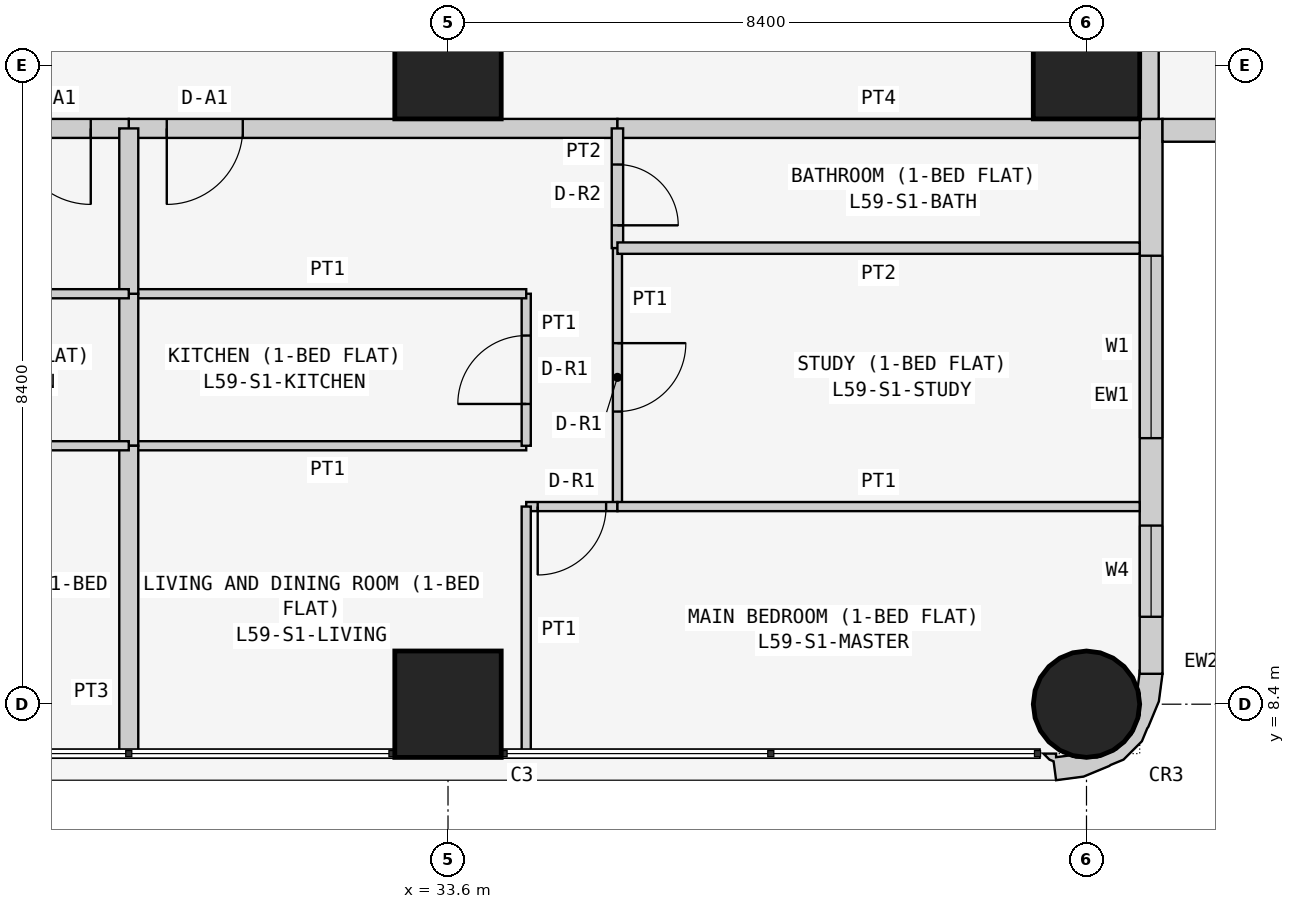
"""IFC4 building model, lengths in metres.
Left out: names, types, materials, properties, quantities, classifications, styles, units other than length and angle.
Written with IfcOpenShell. Run it as: python <this file> out.ifc"""

import sys

from ifc_helpers import new_model, si_unit, direction, frame, frame_2d, origin, origin_2d, place, context, subcontext, project, spatial, polyline, rectangle, circle, outline, extrude, element, fill, save


model = new_model("IFC4")
c1 = context("Model", 3, precision=1e-05, world=origin(), true_north=direction((0.0, 1.0)))
c2 = subcontext(c1, "Body", "Model", "MODEL_VIEW")
j1 = project(units=[si_unit("LENGTHUNIT", "METRE"), si_unit("PLANEANGLEUNIT", "RADIAN")], contexts=[c1])
p1 = place(None, origin())
s1 = spatial("IfcSite", under=j1, at=p1, CompositionType="ELEMENT")
p2 = place(p1, origin())
s2 = spatial("IfcBuilding", under=s1, at=p2, CompositionType="ELEMENT")
p3 = place(p2, frame((0.0, 0.0, 226.5)))
s3 = spatial("IfcBuildingStorey", under=s2, at=p3, CompositionType="ELEMENT", Elevation=226.5)
for number, where, z_axis, x_axis in (
    (1, (33.6, 8.4, 0.0), (0.0, 0.0, 1.0), (1.0, 0.0, 0.0)),
    (2, (33.6, 16.8, 0.0), (0.0, 0.0, 1.0), (1.0, 0.0, 0.0)),
):
    element("IfcColumn", number, at=place(p3, frame(where, z_axis=z_axis, x_axis=x_axis)), inside=s3, PredefinedType="COLUMN", context=c2, shape_type="SweptSolid", body=[
        extrude(rectangle(XDim=1.4, YDim=1.4, at=origin_2d()), origin(), (0.0, 0.0, 1.0), 3.6),
    ])
p4 = place(p3, frame((42.0, 8.4, 0.0), z_axis=(0.0, 0.0, 1.0), x_axis=(1.0, 0.0, 0.0)))
e3 = element("IfcColumn", 3, at=p4, inside=s3, PredefinedType="COLUMN", context=c2, shape_type="SweptSolid", body=[
    extrude(circle(Radius=0.7, at=origin_2d()), origin(), (0.0, 0.0, 1.0), 3.6),
])
p5 = place(p3, frame((42.0, 16.8, 0.0), z_axis=(0.0, 0.0, 1.0), x_axis=(1.0, 0.0, 0.0)))
e4 = element("IfcColumn", 4, at=p5, inside=s3, PredefinedType="COLUMN", context=c2, shape_type="SweptSolid", body=[
    extrude(rectangle(XDim=1.4, YDim=1.4, at=origin_2d()), origin(), (0.0, 0.0, 1.0), 3.6),
])
p6 = place(p3, frame((42.85, 8.8, 0.0), z_axis=(0.0, 0.0, 1.0), x_axis=(0.0, 1.0, 0.0)))
e5 = element("IfcWall", 5, at=p6, inside=s3, PredefinedType="SOLIDWALL", context=c2, shape_type="SweptSolid", body=[
    extrude(rectangle(XDim=7.3, YDim=0.3, at=frame_2d((3.65, 0.0))), origin(), (0.0, 0.0, 1.0), 3.45),
])
p7 = place(p6, frame((3.1, 0.0, 0.9)))
e6 = element("IfcOpeningElement", 6, at=p7, cuts=e5, PredefinedType="OPENING", context=c2, shape_type="SweptSolid", body=[
    extrude(rectangle(XDim=2.4, YDim=1.5, at=frame_2d((1.2, 0.75))), frame((0.0, 0.16, 0.0), z_axis=(0.0, -1.0, 0.0), x_axis=(1.0, 0.0, 0.0)), (0.0, 0.0, 1.0), 0.32),
])
p8 = place(p6, frame((0.75, 0.0, 0.9)))
e7 = element("IfcOpeningElement", 7, at=p8, cuts=e5, PredefinedType="OPENING", context=c2, shape_type="SweptSolid", body=[
    extrude(rectangle(XDim=1.2, YDim=1.5, at=frame_2d((0.6, 0.75))), frame((0.0, 0.16, 0.0), z_axis=(0.0, -1.0, 0.0), x_axis=(1.0, 0.0, 0.0)), (0.0, 0.0, 1.0), 0.32),
])
p9 = place(p3, frame((43.0, 15.95, 0.0), z_axis=(0.0, 0.0, 1.0), x_axis=(1.0, 0.0, 0.0)))
e8 = element("IfcWall", 8, at=p9, inside=s3, PredefinedType="SOLIDWALL", context=c2, shape_type="SweptSolid", body=[
    extrude(rectangle(XDim=7.0, YDim=0.3, at=frame_2d((3.5, 0.0))), origin(), (0.0, 0.0, 1.0), 3.45),
])
p10 = place(p9, frame((1.5, 0.0, 0.9)))
e9 = element("IfcOpeningElement", 9, at=p10, cuts=e8, PredefinedType="OPENING", context=c2, shape_type="SweptSolid", body=[
    extrude(rectangle(XDim=2.4, YDim=1.5, at=frame_2d((1.2, 0.75))), frame((0.0, 0.16, 0.0), z_axis=(0.0, -1.0, 0.0), x_axis=(1.0, 0.0, 0.0)), (0.0, 0.0, 1.0), 0.32),
])
p11 = place(p9, frame((5.05, 0.0, 0.9)))
e10 = element("IfcOpeningElement", 10, at=p11, cuts=e8, PredefinedType="OPENING", context=c2, shape_type="SweptSolid", body=[
    extrude(rectangle(XDim=1.2, YDim=1.5, at=frame_2d((0.6, 0.75))), frame((0.0, 0.16, 0.0), z_axis=(0.0, -1.0, 0.0), x_axis=(1.0, 0.0, 0.0)), (0.0, 0.0, 1.0), 0.32),
])
p12 = place(p3, frame((41.488, 7.812, 0.0), z_axis=(0.0, 0.0, 1.0), x_axis=(0.439933741929, -0.898030234854, 0.0)))
e11 = element("IfcWall", 11, at=p12, inside=s3, PredefinedType="SOLIDWALL", context=c2, shape_type="SweptSolid", body=[
    extrude(outline(polyline([(-0.222, 1.793), (-0.39, 1.541), (-0.372, 1.532), (-0.195, 1.414), (-0.12, 1.41), (0.131, 1.287), (0.315, 1.078), (0.406, 0.814), (0.388, 0.536), (0.265, 0.285), (0.209, 0.235), (0.148, 0.053), (0.105, 0.074), (0.032, -0.076), (0.138, -0.04), (0.182, -0.0), (0.419, -0.08), (0.536, 0.266), (0.559, 0.631), (0.555, 0.651), (0.566, 0.836), (0.455, 1.159), (0.333, 1.298), (0.324, 1.317), (0.082, 1.591), (-0.222, 1.793)])), origin(), (0.0, 0.0, 1.0), 3.45),
])
p13 = place(p3, frame((42.825, 22.571, 0.0), z_axis=(0.0, 0.0, 1.0), x_axis=(0.0, -1.0, 0.0)))
e12 = element("IfcWall", 12, at=p13, inside=s3, PredefinedType="PARTITIONING", context=c2, shape_type="SweptSolid", body=[
    extrude(rectangle(XDim=6.471, YDim=0.25, at=frame_2d((3.235, 0.0))), origin(), (0.0, 0.0, 1.0), 3.45),
])
p14 = place(p3, frame((35.829, 15.975, 0.0), z_axis=(0.0, 0.0, 1.0), x_axis=(-1.0, 0.0, 0.0)))
e13 = element("IfcWall", 13, at=p14, inside=s3, PredefinedType="PARTITIONING", context=c2, shape_type="SweptSolid", body=[
    extrude(rectangle(XDim=6.429, YDim=0.25, at=frame_2d((3.215, 0.0))), origin(), (0.0, 0.0, 1.0), 3.45),
])
p15 = place(p14, frame((4.929, 0.0, 0.0)))
e14 = element("IfcOpeningElement", 14, at=p15, cuts=e13, PredefinedType="OPENING", context=c2, shape_type="SweptSolid", body=[
    extrude(rectangle(XDim=1.0, YDim=2.1, at=frame_2d((0.5, 1.05))), frame((0.0, 0.135, 0.0), z_axis=(0.0, -1.0, 0.0), x_axis=(1.0, 0.0, 0.0)), (0.0, 0.0, 1.0), 0.27),
])
p16 = place(p3, frame((42.7, 15.975, 0.0), z_axis=(0.0, 0.0, 1.0), x_axis=(-1.0, 0.0, 0.0)))
e15 = element("IfcWall", 15, at=p16, inside=s3, PredefinedType="PARTITIONING", context=c2, shape_type="SweptSolid", body=[
    extrude(rectangle(XDim=6.871, YDim=0.25, at=frame_2d((3.436, 0.0))), origin(), (0.0, 0.0, 1.0), 3.45),
])
p17 = place(p3, frame((29.4, 15.975, 0.0), z_axis=(0.0, 0.0, 1.0), x_axis=(-1.0, 0.0, 0.0)))
e16 = element("IfcWall", 16, at=p17, inside=s3, PredefinedType="PARTITIONING", context=c2, shape_type="SweptSolid", body=[
    extrude(rectangle(XDim=6.429, YDim=0.25, at=frame_2d((3.214, 0.0))), origin(), (0.0, 0.0, 1.0), 3.45),
])
p18 = place(p17, frame((0.5, 0.0, 0.0)))
e17 = element("IfcOpeningElement", 17, at=p18, cuts=e16, PredefinedType="OPENING", context=c2, shape_type="SweptSolid", body=[
    extrude(rectangle(XDim=1.0, YDim=2.1, at=frame_2d((0.5, 1.05))), frame((0.0, 0.135, 0.0), z_axis=(0.0, -1.0, 0.0), x_axis=(1.0, 0.0, 0.0)), (0.0, 0.0, 1.0), 0.27),
])
p19 = place(p3, frame((29.4, 11.8, 0.0), z_axis=(0.0, 0.0, 1.0), x_axis=(1.0, 0.0, 0.0)))
e18 = element("IfcWall", 18, at=p19, inside=s3, PredefinedType="PARTITIONING", context=c2, shape_type="SweptSolid", body=[
    extrude(rectangle(XDim=5.229, YDim=0.12, at=frame_2d((2.615, 0.0))), origin(), (0.0, 0.0, 1.0), 3.45),
])
p20 = place(p3, frame((34.629, 11.8, 0.0), z_axis=(0.0, 0.0, 1.0), x_axis=(0.0, 1.0, 0.0)))
e19 = element("IfcWall", 19, at=p20, inside=s3, PredefinedType="PARTITIONING", context=c2, shape_type="SweptSolid", body=[
    extrude(rectangle(XDim=2.0, YDim=0.12, at=frame_2d((1.0, 0.0))), origin(), (0.0, 0.0, 1.0), 3.45),
])
p21 = place(p20, frame((0.55, 0.0, 0.0)))
e20 = element("IfcOpeningElement", 20, at=p21, cuts=e19, PredefinedType="OPENING", context=c2, shape_type="SweptSolid", body=[
    extrude(rectangle(XDim=0.9, YDim=2.1, at=frame_2d((0.45, 1.05))), frame((0.0, 0.07, 0.0), z_axis=(0.0, -1.0, 0.0), x_axis=(1.0, 0.0, 0.0)), (0.0, 0.0, 1.0), 0.14),
])
p22 = place(p3, frame((34.629, 13.8, 0.0), z_axis=(0.0, 0.0, 1.0), x_axis=(-1.0, 0.0, 0.0)))
e21 = element("IfcWall", 21, at=p22, inside=s3, PredefinedType="PARTITIONING", context=c2, shape_type="SweptSolid", body=[
    extrude(rectangle(XDim=5.229, YDim=0.12, at=frame_2d((2.615, 0.0))), origin(), (0.0, 0.0, 1.0), 3.45),
])
p23 = place(p3, frame((29.4, 13.8, 0.0), z_axis=(0.0, 0.0, 1.0), x_axis=(0.0, -1.0, 0.0)))
e22 = element("IfcWall", 22, at=p23, inside=s3, PredefinedType="PARTITIONING", context=c2, shape_type="SweptSolid", body=[
    extrude(rectangle(XDim=2.0, YDim=0.25, at=frame_2d((1.0, 0.0))), origin(), (0.0, 0.0, 1.0), 2.848),
])
p24 = place(p3, frame((35.829, 15.975, 0.0), z_axis=(0.0, 0.0, 1.0), x_axis=(0.0, -1.0, 0.0)))
e23 = element("IfcWall", 23, at=p24, inside=s3, PredefinedType="PARTITIONING", context=c2, shape_type="SweptSolid", body=[
    extrude(rectangle(XDim=1.575, YDim=0.15, at=frame_2d((0.788, 0.0))), origin(), (0.0, 0.0, 1.0), 3.45),
])
p25 = place(p24, frame((0.475, 0.0, 0.0)))
e24 = element("IfcOpeningElement", 24, at=p25, cuts=e23, PredefinedType="OPENING", context=c2, shape_type="SweptSolid", body=[
    extrude(rectangle(XDim=0.8, YDim=2.1, at=frame_2d((0.4, 1.05))), frame((0.0, 0.085, 0.0), z_axis=(0.0, -1.0, 0.0), x_axis=(1.0, 0.0, 0.0)), (0.0, 0.0, 1.0), 0.17),
])
p26 = place(p3, frame((35.829, 14.4, 0.0), z_axis=(0.0, 0.0, 1.0), x_axis=(0.0, -1.0, 0.0)))
e25 = element("IfcWall", 25, at=p26, inside=s3, PredefinedType="PARTITIONING", context=c2, shape_type="SweptSolid", body=[
    extrude(rectangle(XDim=3.4, YDim=0.12, at=frame_2d((1.7, 0.0))), origin(), (0.0, 0.0, 1.0), 3.45),
])
p27 = place(p26, frame((1.25, 0.0, 0.0)))
e26 = element("IfcOpeningElement", 26, at=p27, cuts=e25, PredefinedType="OPENING", context=c2, shape_type="SweptSolid", body=[
    extrude(rectangle(XDim=0.9, YDim=2.1, at=frame_2d((0.45, 1.05))), frame((0.0, 0.07, 0.0), z_axis=(0.0, -1.0, 0.0), x_axis=(1.0, 0.0, 0.0)), (0.0, 0.0, 1.0), 0.14),
])
p28 = place(p3, frame((35.829, 11.0, 0.0), z_axis=(0.0, 0.0, 1.0), x_axis=(-1.0, 0.0, 0.0)))
e27 = element("IfcWall", 27, at=p28, inside=s3, PredefinedType="PARTITIONING", context=c2, shape_type="SweptSolid", body=[
    extrude(rectangle(XDim=1.2, YDim=0.12, at=frame_2d((0.6, 0.0))), origin(), (0.0, 0.0, 1.0), 3.45),
])
p29 = place(p28, frame((0.149, 0.0, 0.0)))
e28 = element("IfcOpeningElement", 28, at=p29, cuts=e27, PredefinedType="OPENING", context=c2, shape_type="SweptSolid", body=[
    extrude(rectangle(XDim=0.9, YDim=2.1, at=frame_2d((0.45, 1.05))), frame((0.0, 0.07, 0.0), z_axis=(0.0, -1.0, 0.0), x_axis=(1.0, 0.0, 0.0)), (0.0, 0.0, 1.0), 0.14),
])
p30 = place(p3, frame((34.629, 11.0, 0.0), z_axis=(0.0, 0.0, 1.0), x_axis=(0.0, -1.0, 0.0)))
e29 = element("IfcWall", 29, at=p30, inside=s3, PredefinedType="PARTITIONING", context=c2, shape_type="SweptSolid", body=[
    extrude(rectangle(XDim=3.25, YDim=0.12, at=frame_2d((1.625, 0.0))), origin(), (0.0, 0.0, 1.0), 3.45),
])
p31 = place(p3, frame((29.4, 7.75, 0.0), z_axis=(0.0, 0.0, 1.0), x_axis=(0.0, 1.0, 0.0)))
e30 = element("IfcWall", 30, at=p31, inside=s3, PredefinedType="PARTITIONING", context=c2, shape_type="SweptSolid", body=[
    extrude(rectangle(XDim=4.05, YDim=0.25, at=frame_2d((2.025, 0.0))), origin(), (0.0, 0.0, 1.0), 2.848),
])
p32 = place(p3, frame((29.4, 13.8, 0.0), z_axis=(0.0, 0.0, 1.0), x_axis=(0.0, 1.0, 0.0)))
e31 = element("IfcWall", 31, at=p32, inside=s3, PredefinedType="PARTITIONING", context=c2, shape_type="SweptSolid", body=[
    extrude(rectangle(XDim=2.175, YDim=0.25, at=frame_2d((1.087, 0.0))), origin(), (0.0, 0.0, 1.0), 2.848),
])
p33 = place(p3, frame((35.829, 14.4, 0.0), z_axis=(0.0, 0.0, 1.0), x_axis=(1.0, 0.0, 0.0)))
e32 = element("IfcWall", 32, at=p33, inside=s3, PredefinedType="PARTITIONING", context=c2, shape_type="SweptSolid", body=[
    extrude(rectangle(XDim=6.871, YDim=0.15, at=frame_2d((3.436, 0.0))), origin(), (0.0, 0.0, 1.0), 3.45),
])
p34 = place(p3, frame((35.829, 11.0, 0.0), z_axis=(0.0, 0.0, 1.0), x_axis=(1.0, 0.0, 0.0)))
e33 = element("IfcWall", 33, at=p34, inside=s3, PredefinedType="PARTITIONING", context=c2, shape_type="SweptSolid", body=[
    extrude(rectangle(XDim=6.871, YDim=0.12, at=frame_2d((3.436, 0.0))), origin(), (0.0, 0.0, 1.0), 3.45),
])
for number, where, z_axis, x_axis in (
    (34, (29.4, 11.8, 0.0), (0.0, 0.0, 1.0), (-1.0, 0.0, 0.0)),
    (35, (24.171, 13.8, 0.0), (0.0, 0.0, 1.0), (1.0, 0.0, 0.0)),
):
    element("IfcWall", number, at=place(p3, frame(where, z_axis=z_axis, x_axis=x_axis)), inside=s3, PredefinedType="PARTITIONING", context=c2, shape_type="SweptSolid", body=[
        extrude(rectangle(XDim=5.229, YDim=0.12, at=frame_2d((2.615, 0.0))), origin(), (0.0, 0.0, 1.0), 3.45),
    ])
p35 = place(p7, origin())
e36 = element("IfcWindow", 36, at=p35, inside=s3, PartitioningType="SINGLE_PANEL", PredefinedType="WINDOW", context=c2, shape_type="SweptSolid", body=[
    extrude(rectangle(XDim=2.4, YDim=1.5, at=frame_2d((1.2, 0.75))), frame((0.0, 0.03, 0.0), z_axis=(0.0, -1.0, 0.0), x_axis=(1.0, 0.0, 0.0)), (0.0, 0.0, 1.0), 0.06),
])
fill(e6, e36)
p36 = place(p8, origin())
e37 = element("IfcWindow", 37, at=p36, inside=s3, PartitioningType="SINGLE_PANEL", PredefinedType="WINDOW", context=c2, shape_type="SweptSolid", body=[
    extrude(rectangle(XDim=1.2, YDim=1.5, at=frame_2d((0.6, 0.75))), frame((0.0, 0.03, 0.0), z_axis=(0.0, -1.0, 0.0), x_axis=(1.0, 0.0, 0.0)), (0.0, 0.0, 1.0), 0.06),
])
fill(e7, e37)
p37 = place(p15, origin())
e38 = element("IfcDoor", 38, at=p37, inside=s3, OperationType="SINGLE_SWING_RIGHT", PredefinedType="DOOR", context=c2, shape_type="SweptSolid", body=[
    extrude(rectangle(XDim=1.0, YDim=2.1, at=frame_2d((0.5, 1.05))), frame((0.0, 0.025, 0.0), z_axis=(0.0, -1.0, 0.0), x_axis=(1.0, 0.0, 0.0)), (0.0, 0.0, 1.0), 0.05),
])
fill(e14, e38)
p38 = place(p21, origin())
e39 = element("IfcDoor", 39, at=p38, inside=s3, OperationType="SINGLE_SWING_LEFT", PredefinedType="DOOR", context=c2, shape_type="SweptSolid", body=[
    extrude(rectangle(XDim=0.9, YDim=2.1, at=frame_2d((0.45, 1.05))), frame((0.0, 0.025, 0.0), z_axis=(0.0, -1.0, 0.0), x_axis=(1.0, 0.0, 0.0)), (0.0, 0.0, 1.0), 0.05),
])
fill(e20, e39)
p39 = place(p25, origin())
e40 = element("IfcDoor", 40, at=p39, inside=s3, OperationType="SINGLE_SWING_RIGHT", PredefinedType="DOOR", context=c2, shape_type="SweptSolid", body=[
    extrude(rectangle(XDim=0.8, YDim=2.1, at=frame_2d((0.4, 1.05))), frame((0.0, 0.025, 0.0), z_axis=(0.0, -1.0, 0.0), x_axis=(1.0, 0.0, 0.0)), (0.0, 0.0, 1.0), 0.05),
])
fill(e24, e40)
p40 = place(p27, origin())
e41 = element("IfcDoor", 41, at=p40, inside=s3, OperationType="SINGLE_SWING_LEFT", PredefinedType="DOOR", context=c2, shape_type="SweptSolid", body=[
    extrude(rectangle(XDim=0.9, YDim=2.1, at=frame_2d((0.45, 1.05))), frame((0.0, 0.025, 0.0), z_axis=(0.0, -1.0, 0.0), x_axis=(1.0, 0.0, 0.0)), (0.0, 0.0, 1.0), 0.05),
])
fill(e26, e41)
p41 = place(p29, origin())
e42 = element("IfcDoor", 42, at=p41, inside=s3, OperationType="SINGLE_SWING_RIGHT", PredefinedType="DOOR", context=c2, shape_type="SweptSolid", body=[
    extrude(rectangle(XDim=0.9, YDim=2.1, at=frame_2d((0.45, 1.05))), frame((0.0, 0.025, 0.0), z_axis=(0.0, -1.0, 0.0), x_axis=(1.0, 0.0, 0.0)), (0.0, 0.0, 1.0), 0.05),
])
fill(e28, e42)
p42 = place(p18, origin())
e43 = element("IfcDoor", 43, at=p42, inside=s3, OperationType="SINGLE_SWING_LEFT", PredefinedType="DOOR", context=c2, shape_type="SweptSolid", body=[
    extrude(rectangle(XDim=1.0, YDim=2.1, at=frame_2d((0.5, 1.05))), frame((0.0, 0.025, 0.0), z_axis=(0.0, -1.0, 0.0), x_axis=(1.0, 0.0, 0.0)), (0.0, 0.0, 1.0), 0.05),
])
fill(e17, e43)
save(model, sys.argv[1])
